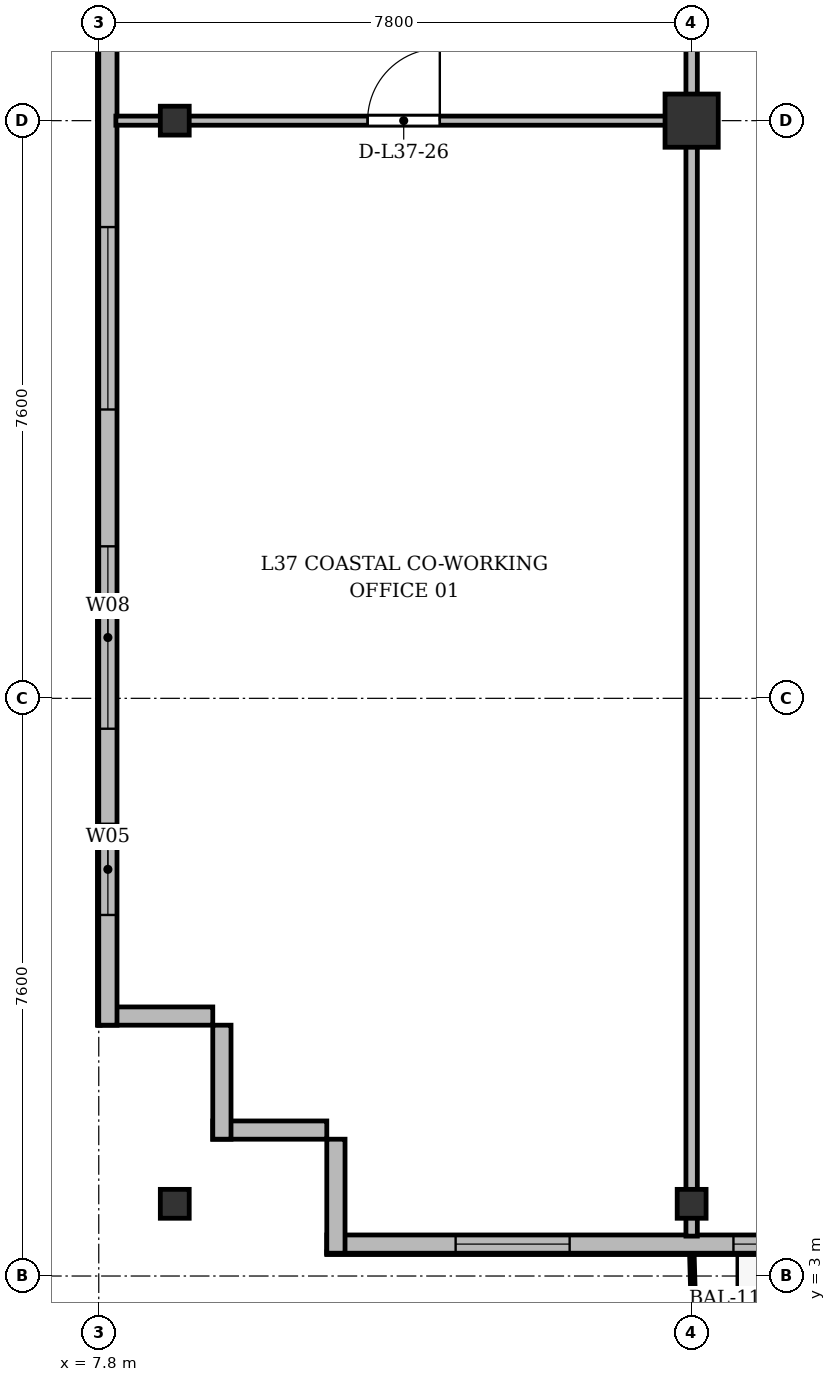
"""IFC4 building model, lengths in metres.
Left out: names, types, materials, properties, quantities, classifications, styles, units other than length and angle.
Written with IfcOpenShell. Run it as: python <this file> out.ifc"""

import sys

from ifc_helpers import new_model, si_unit, direction, frame, frame_2d, origin, origin_2d, place, context, subcontext, project, spatial, rectangle, i_section, extrude, source, transform, mapped, element, fill, save


model = new_model("IFC4")
c1 = context("Model", 3, precision=1e-05, world=origin(), true_north=direction((0.0, 1.0)))
c2 = subcontext(c1, "Body", "Model", "MODEL_VIEW")
j1 = project(units=[si_unit("LENGTHUNIT", "METRE"), si_unit("PLANEANGLEUNIT", "RADIAN")], contexts=[c1])
p1 = place(None, origin())
s1 = spatial("IfcSite", under=j1, at=p1, CompositionType="ELEMENT")
p2 = place(p1, origin())
s2 = spatial("IfcBuilding", under=s1, at=p2, CompositionType="ELEMENT")
p3 = place(p2, frame((0.0, 0.0, 142.9)))
s3 = spatial("IfcBuildingStorey", under=s2, at=p3, CompositionType="ELEMENT", Elevation=142.9)
m1 = source(origin(), c2, "Body", "SweptSolid", [
    extrude(i_section(OverallWidth=0.38, OverallDepth=0.38, WebThickness=0.02, FlangeThickness=0.03, at=origin_2d()), origin(), (0.0, 0.0, 1.0), 3.6),
])
for number, where, z_axis, x_axis in (
    (1, (8.8, 3.95, 0.0), (0.0, 0.0, 1.0), (1.0, 0.0, 0.0)),
    (2, (8.8, 18.2, 0.0), (0.0, 0.0, 1.0), (1.0, 0.0, 0.0)),
    (3, (15.6, 3.95, 0.0), (0.0, 0.0, 1.0), (1.0, 0.0, 0.0)),
):
    element("IfcColumn", number, at=place(p3, frame(where, z_axis=z_axis, x_axis=x_axis)), inside=s3, PredefinedType="COLUMN", context=c2, shape_type="MappedRepresentation", body=[
        mapped(m1, transform((0.0, 0.0, 0.0), x_axis=(1.0, 0.0, 0.0), y_axis=(0.0, 1.0, 0.0), z_axis=(0.0, 0.0, 1.0), scale=1.0)),
    ])
m2 = source(origin(), c2, "Body", "SweptSolid", [
    extrude(rectangle(XDim=0.7, YDim=0.7, at=origin_2d()), origin(), (0.0, 0.0, 1.0), 3.6),
])
p4 = place(p3, frame((15.6, 18.2, 0.0), z_axis=(0.0, 0.0, 1.0), x_axis=(1.0, 0.0, 0.0)))
e4 = element("IfcColumn", 4, at=p4, inside=s3, PredefinedType="COLUMN", context=c2, shape_type="MappedRepresentation", body=[
    mapped(m2, transform((0.0, 0.0, 0.0), x_axis=(1.0, 0.0, 0.0), y_axis=(0.0, 1.0, 0.0), z_axis=(0.0, 0.0, 1.0), scale=1.0)),
])
for number, where, z_axis, x_axis in (
    (5, (10.8, 4.92, 0.0), (0.0, 0.0, 1.0), (-1.0, 0.0, 0.0)),
    (6, (9.42, 4.8, 0.0), (0.0, 0.0, 1.0), (0.0, 1.0, 0.0)),
):
    element("IfcWall", number, at=place(p3, frame(where, z_axis=z_axis, x_axis=x_axis)), inside=s3, PredefinedType="SOLIDWALL", context=c2, shape_type="SweptSolid", body=[
        extrude(rectangle(XDim=1.5, YDim=0.24, at=frame_2d((0.75, 0.0))), origin(), (0.0, 0.0, 1.0), 3.35),
    ])
p5 = place(p3, frame((9.3, 6.42, 0.0), z_axis=(0.0, 0.0, 1.0), x_axis=(-1.0, 0.0, 0.0)))
e7 = element("IfcWall", 7, at=p5, inside=s3, PredefinedType="SOLIDWALL", context=c2, shape_type="SweptSolid", body=[
    extrude(rectangle(XDim=1.5, YDim=0.24, at=frame_2d((0.75, 0.0))), origin(), (0.0, 0.0, 1.0), 2.85),
])
p6 = place(p3, frame((7.92, 6.3, 0.0), z_axis=(0.0, 0.0, 1.0), x_axis=(0.0, 1.0, 0.0)))
e8 = element("IfcWall", 8, at=p6, inside=s3, PredefinedType="SOLIDWALL", context=c2, shape_type="SweptSolid", body=[
    extrude(rectangle(XDim=39.2, YDim=0.24, at=frame_2d((19.6, 0.0))), origin(), (0.0, 0.0, 1.0), 3.35),
])
p7 = place(p6, frame((1.45, 0.0, 0.92)))
e9 = element("IfcOpeningElement", 9, at=p7, cuts=e8, PredefinedType="OPENING", context=c2, shape_type="SweptSolid", body=[
    extrude(rectangle(XDim=1.2, YDim=1.65, at=frame_2d((0.6, 0.825))), frame((0.0, 0.13, 0.0), z_axis=(0.0, -1.0, 0.0), x_axis=(1.0, 0.0, 0.0)), (0.0, 0.0, 1.0), 0.26),
])
p8 = place(p6, frame((3.9, 0.0, 0.92)))
e10 = element("IfcOpeningElement", 10, at=p8, cuts=e8, PredefinedType="OPENING", context=c2, shape_type="SweptSolid", body=[
    extrude(rectangle(XDim=2.4, YDim=2.1, at=frame_2d((1.2, 1.05))), frame((0.0, 0.13, 0.0), z_axis=(0.0, -1.0, 0.0), x_axis=(1.0, 0.0, 0.0)), (0.0, 0.0, 1.0), 0.26),
])
p9 = place(p6, frame((8.1, 0.0, 0.92)))
e11 = element("IfcOpeningElement", 11, at=p9, cuts=e8, PredefinedType="OPENING", context=c2, shape_type="SweptSolid", body=[
    extrude(rectangle(XDim=2.4, YDim=2.1, at=frame_2d((1.2, 1.05))), frame((0.0, 0.13, 0.0), z_axis=(0.0, -1.0, 0.0), x_axis=(1.0, 0.0, 0.0)), (0.0, 0.0, 1.0), 0.26),
])
p10 = place(p6, frame((15.3, 0.0, 0.92)))
e12 = element("IfcOpeningElement", 12, at=p10, cuts=e8, PredefinedType="OPENING", context=c2, shape_type="SweptSolid", body=[
    extrude(rectangle(XDim=2.4, YDim=2.1, at=frame_2d((1.2, 1.05))), frame((0.0, 0.13, 0.0), z_axis=(0.0, -1.0, 0.0), x_axis=(1.0, 0.0, 0.0)), (0.0, 0.0, 1.0), 0.26),
])
p11 = place(p6, frame((29.3, 0.0, 0.92)))
e13 = element("IfcOpeningElement", 13, at=p11, cuts=e8, PredefinedType="OPENING", context=c2, shape_type="SweptSolid", body=[
    extrude(rectangle(XDim=2.4, YDim=2.1, at=frame_2d((1.2, 1.05))), frame((0.0, 0.13, 0.0), z_axis=(0.0, -1.0, 0.0), x_axis=(1.0, 0.0, 0.0)), (0.0, 0.0, 1.0), 0.26),
])
p12 = place(p6, frame((33.5, 0.0, 0.92)))
e14 = element("IfcOpeningElement", 14, at=p12, cuts=e8, PredefinedType="OPENING", context=c2, shape_type="SweptSolid", body=[
    extrude(rectangle(XDim=1.2, YDim=1.65, at=frame_2d((0.6, 0.825))), frame((0.0, 0.13, 0.0), z_axis=(0.0, -1.0, 0.0), x_axis=(1.0, 0.0, 0.0)), (0.0, 0.0, 1.0), 0.26),
])
p13 = place(p6, frame((36.85, 0.0, 0.92)))
e15 = element("IfcOpeningElement", 15, at=p13, cuts=e8, PredefinedType="OPENING", context=c2, shape_type="SweptSolid", body=[
    extrude(rectangle(XDim=1.2, YDim=1.65, at=frame_2d((0.6, 0.825))), frame((0.0, 0.13, 0.0), z_axis=(0.0, -1.0, 0.0), x_axis=(1.0, 0.0, 0.0)), (0.0, 0.0, 1.0), 0.26),
])
p14 = place(p3, frame((63.6, 3.42, 0.0), z_axis=(0.0, 0.0, 1.0), x_axis=(-1.0, 0.0, 0.0)))
e16 = element("IfcWall", 16, at=p14, inside=s3, PredefinedType="SOLIDWALL", context=c2, shape_type="SweptSolid", body=[
    extrude(rectangle(XDim=52.8, YDim=0.24, at=frame_2d((26.4, 0.0))), origin(), (0.0, 0.0, 1.0), 3.35),
])
p15 = place(p14, frame((1.695, 0.0, 0.9)))
e17 = element("IfcOpeningElement", 17, at=p15, cuts=e16, PredefinedType="OPENING", context=c2, shape_type="SweptSolid", body=[
    extrude(rectangle(XDim=1.5, YDim=1.75, at=frame_2d((0.75, 0.875))), frame((0.0, 0.13, 0.0), z_axis=(0.0, -1.0, 0.0), x_axis=(1.0, 0.0, 0.0)), (0.0, 0.0, 1.0), 0.26),
])
p16 = place(p14, frame((5.1, 0.0, 0.9)))
e18 = element("IfcOpeningElement", 18, at=p16, cuts=e16, PredefinedType="OPENING", context=c2, shape_type="SweptSolid", body=[
    extrude(rectangle(XDim=2.0, YDim=1.95, at=frame_2d((1.0, 0.975))), frame((0.0, 0.13, 0.0), z_axis=(0.0, -1.0, 0.0), x_axis=(1.0, 0.0, 0.0)), (0.0, 0.0, 1.0), 0.26),
])
p17 = place(p14, frame((7.65, 0.0, 0.9)))
e19 = element("IfcOpeningElement", 19, at=p17, cuts=e16, PredefinedType="OPENING", context=c2, shape_type="SweptSolid", body=[
    extrude(rectangle(XDim=1.5, YDim=1.75, at=frame_2d((0.75, 0.875))), frame((0.0, 0.13, 0.0), z_axis=(0.0, -1.0, 0.0), x_axis=(1.0, 0.0, 0.0)), (0.0, 0.0, 1.0), 0.26),
])
p18 = place(p14, frame((10.1, 0.0, 0.9)))
e20 = element("IfcOpeningElement", 20, at=p18, cuts=e16, PredefinedType="OPENING", context=c2, shape_type="SweptSolid", body=[
    extrude(rectangle(XDim=1.8, YDim=1.8, at=frame_2d((0.9, 0.9))), frame((0.0, 0.13, 0.0), z_axis=(0.0, -1.0, 0.0), x_axis=(1.0, 0.0, 0.0)), (0.0, 0.0, 1.0), 0.26),
])
p19 = place(p14, frame((14.417, 0.0, 0.0)))
e21 = element("IfcOpeningElement", 21, at=p19, cuts=e16, PredefinedType="OPENING", context=c2, shape_type="SweptSolid", body=[
    extrude(rectangle(XDim=1.2, YDim=2.2, at=frame_2d((0.6, 1.1))), frame((0.0, 0.13, 0.0), z_axis=(0.0, -1.0, 0.0), x_axis=(1.0, 0.0, 0.0)), (0.0, 0.0, 1.0), 0.26),
])
p20 = place(p14, frame((25.65, 0.0, 0.9)))
e22 = element("IfcOpeningElement", 22, at=p20, cuts=e16, PredefinedType="OPENING", context=c2, shape_type="SweptSolid", body=[
    extrude(rectangle(XDim=1.5, YDim=1.75, at=frame_2d((0.75, 0.875))), frame((0.0, 0.13, 0.0), z_axis=(0.0, -1.0, 0.0), x_axis=(1.0, 0.0, 0.0)), (0.0, 0.0, 1.0), 0.26),
])
p21 = place(p14, frame((35.6, 0.0, 0.9)))
e23 = element("IfcOpeningElement", 23, at=p21, cuts=e16, PredefinedType="OPENING", context=c2, shape_type="SweptSolid", body=[
    extrude(rectangle(XDim=2.0, YDim=1.95, at=frame_2d((1.0, 0.975))), frame((0.0, 0.13, 0.0), z_axis=(0.0, -1.0, 0.0), x_axis=(1.0, 0.0, 0.0)), (0.0, 0.0, 1.0), 0.26),
])
p22 = place(p14, frame((41.656, 0.0, 0.0)))
e24 = element("IfcOpeningElement", 24, at=p22, cuts=e16, PredefinedType="OPENING", context=c2, shape_type="SweptSolid", body=[
    extrude(rectangle(XDim=1.2, YDim=2.2, at=frame_2d((0.6, 1.1))), frame((0.0, 0.13, 0.0), z_axis=(0.0, -1.0, 0.0), x_axis=(1.0, 0.0, 0.0)), (0.0, 0.0, 1.0), 0.26),
])
p23 = place(p14, frame((43.65, 0.0, 0.9)))
e25 = element("IfcOpeningElement", 25, at=p23, cuts=e16, PredefinedType="OPENING", context=c2, shape_type="SweptSolid", body=[
    extrude(rectangle(XDim=1.5, YDim=1.75, at=frame_2d((0.75, 0.875))), frame((0.0, 0.13, 0.0), z_axis=(0.0, -1.0, 0.0), x_axis=(1.0, 0.0, 0.0)), (0.0, 0.0, 1.0), 0.26),
])
p24 = place(p14, frame((45.95, 0.0, 0.9)))
e26 = element("IfcOpeningElement", 26, at=p24, cuts=e16, PredefinedType="OPENING", context=c2, shape_type="SweptSolid", body=[
    extrude(rectangle(XDim=1.5, YDim=1.75, at=frame_2d((0.75, 0.875))), frame((0.0, 0.13, 0.0), z_axis=(0.0, -1.0, 0.0), x_axis=(1.0, 0.0, 0.0)), (0.0, 0.0, 1.0), 0.26),
])
p25 = place(p14, frame((49.605, 0.0, 0.9)))
e27 = element("IfcOpeningElement", 27, at=p25, cuts=e16, PredefinedType="OPENING", context=c2, shape_type="SweptSolid", body=[
    extrude(rectangle(XDim=1.5, YDim=1.75, at=frame_2d((0.75, 0.875))), frame((0.0, 0.13, 0.0), z_axis=(0.0, -1.0, 0.0), x_axis=(1.0, 0.0, 0.0)), (0.0, 0.0, 1.0), 0.26),
])
p26 = place(p3, frame((10.92, 3.3, 0.0), z_axis=(0.0, 0.0, 1.0), x_axis=(0.0, 1.0, 0.0)))
e28 = element("IfcWall", 28, at=p26, inside=s3, PredefinedType="SOLIDWALL", context=c2, shape_type="SweptSolid", body=[
    extrude(rectangle(XDim=1.5, YDim=0.24, at=frame_2d((0.75, 0.0))), origin(), (0.0, 0.0, 1.0), 2.75),
])
p27 = place(p3, frame((15.6, 3.525, 0.0), z_axis=(0.0, 0.0, 1.0), x_axis=(0.0, 1.0, 0.0)))
e29 = element("IfcWall", 29, at=p27, inside=s3, PredefinedType="PARTITIONING", context=c2, shape_type="SweptSolid", body=[
    extrude(rectangle(XDim=27.275, YDim=0.15, at=frame_2d((13.638, 0.0))), origin(), (0.0, 0.0, 1.0), 2.85),
])
p28 = place(p3, frame((8.025, 18.2, 0.0), z_axis=(0.0, 0.0, 1.0), x_axis=(1.0, 0.0, 0.0)))
e30 = element("IfcWall", 30, at=p28, inside=s3, PredefinedType="PARTITIONING", context=c2, shape_type="SweptSolid", body=[
    extrude(rectangle(XDim=7.575, YDim=0.12, at=frame_2d((3.788, 0.0))), origin(), (0.0, 0.0, 1.0), 2.75),
])
p29 = place(p28, frame((3.312, 0.0, 0.0)))
e31 = element("IfcOpeningElement", 31, at=p29, cuts=e30, PredefinedType="OPENING", context=c2, shape_type="SweptSolid", body=[
    extrude(rectangle(XDim=0.95, YDim=2.15, at=frame_2d((0.475, 1.075))), frame((0.0, 0.07, 0.0), z_axis=(0.0, -1.0, 0.0), x_axis=(1.0, 0.0, 0.0)), (0.0, 0.0, 1.0), 0.14),
])
m3 = source(origin(), c2, "Body", "SweptSolid", [
    extrude(rectangle(XDim=1.2, YDim=1.65, at=frame_2d((0.6, 0.825))), frame((0.0, 0.03, 0.0), z_axis=(0.0, -1.0, 0.0), x_axis=(1.0, 0.0, 0.0)), (0.0, 0.0, 1.0), 0.06),
])
p30 = place(p7, origin())
e32 = element("IfcWindow", 32, at=p30, inside=s3, PartitioningType="SINGLE_PANEL", PredefinedType="WINDOW", context=c2, shape_type="MappedRepresentation", body=[
    mapped(m3, transform((0.0, 0.0, 0.0), x_axis=(1.0, 0.0, 0.0), y_axis=(0.0, 1.0, 0.0), z_axis=(0.0, 0.0, 1.0), scale=1.0)),
])
fill(e9, e32)
m4 = source(origin(), c2, "Body", "SweptSolid", [
    extrude(rectangle(XDim=2.4, YDim=2.1, at=frame_2d((1.2, 1.05))), frame((0.0, 0.03, 0.0), z_axis=(0.0, -1.0, 0.0), x_axis=(1.0, 0.0, 0.0)), (0.0, 0.0, 1.0), 0.06),
])
p31 = place(p8, origin())
e33 = element("IfcWindow", 33, at=p31, inside=s3, PartitioningType="SINGLE_PANEL", PredefinedType="WINDOW", context=c2, shape_type="MappedRepresentation", body=[
    mapped(m4, transform((0.0, 0.0, 0.0), x_axis=(1.0, 0.0, 0.0), y_axis=(0.0, 1.0, 0.0), z_axis=(0.0, 0.0, 1.0), scale=1.0)),
])
fill(e10, e33)
p32 = place(p9, origin())
e34 = element("IfcWindow", 34, at=p32, inside=s3, PartitioningType="SINGLE_PANEL", PredefinedType="WINDOW", context=c2, shape_type="MappedRepresentation", body=[
    mapped(m4, transform((0.0, 0.0, 0.0), x_axis=(1.0, 0.0, 0.0), y_axis=(0.0, 1.0, 0.0), z_axis=(0.0, 0.0, 1.0), scale=1.0)),
])
fill(e11, e34)
m5 = source(origin(), c2, "Body", "SweptSolid", [
    extrude(rectangle(XDim=1.5, YDim=1.75, at=frame_2d((0.75, 0.875))), frame((0.0, 0.03, 0.0), z_axis=(0.0, -1.0, 0.0), x_axis=(1.0, 0.0, 0.0)), (0.0, 0.0, 1.0), 0.06),
])
p33 = place(p24, origin())
e35 = element("IfcWindow", 35, at=p33, inside=s3, PartitioningType="SINGLE_PANEL", PredefinedType="WINDOW", context=c2, shape_type="MappedRepresentation", body=[
    mapped(m5, transform((0.0, 0.0, 0.0), x_axis=(1.0, 0.0, 0.0), y_axis=(0.0, 1.0, 0.0), z_axis=(0.0, 0.0, 1.0), scale=1.0)),
])
fill(e26, e35)
p34 = place(p25, origin())
e36 = element("IfcWindow", 36, at=p34, inside=s3, PartitioningType="SINGLE_PANEL", PredefinedType="WINDOW", context=c2, shape_type="MappedRepresentation", body=[
    mapped(m5, transform((0.0, 0.0, 0.0), x_axis=(1.0, 0.0, 0.0), y_axis=(0.0, 1.0, 0.0), z_axis=(0.0, 0.0, 1.0), scale=1.0)),
])
fill(e27, e36)
m6 = source(origin(), c2, "Body", "SweptSolid", [
    extrude(rectangle(XDim=0.95, YDim=2.15, at=frame_2d((0.475, 1.075))), frame((0.0, 0.025, 0.0), z_axis=(0.0, -1.0, 0.0), x_axis=(1.0, 0.0, 0.0)), (0.0, 0.0, 1.0), 0.05),
])
p35 = place(p29, origin())
e37 = element("IfcDoor", 37, at=p35, inside=s3, OperationType="SINGLE_SWING_RIGHT", PredefinedType="DOOR", context=c2, shape_type="MappedRepresentation", body=[
    mapped(m6, transform((0.0, 0.0, 0.0), x_axis=(1.0, 0.0, 0.0), y_axis=(0.0, 1.0, 0.0), z_axis=(0.0, 0.0, 1.0), scale=1.0)),
])
fill(e31, e37)
save(model, sys.argv[1])
